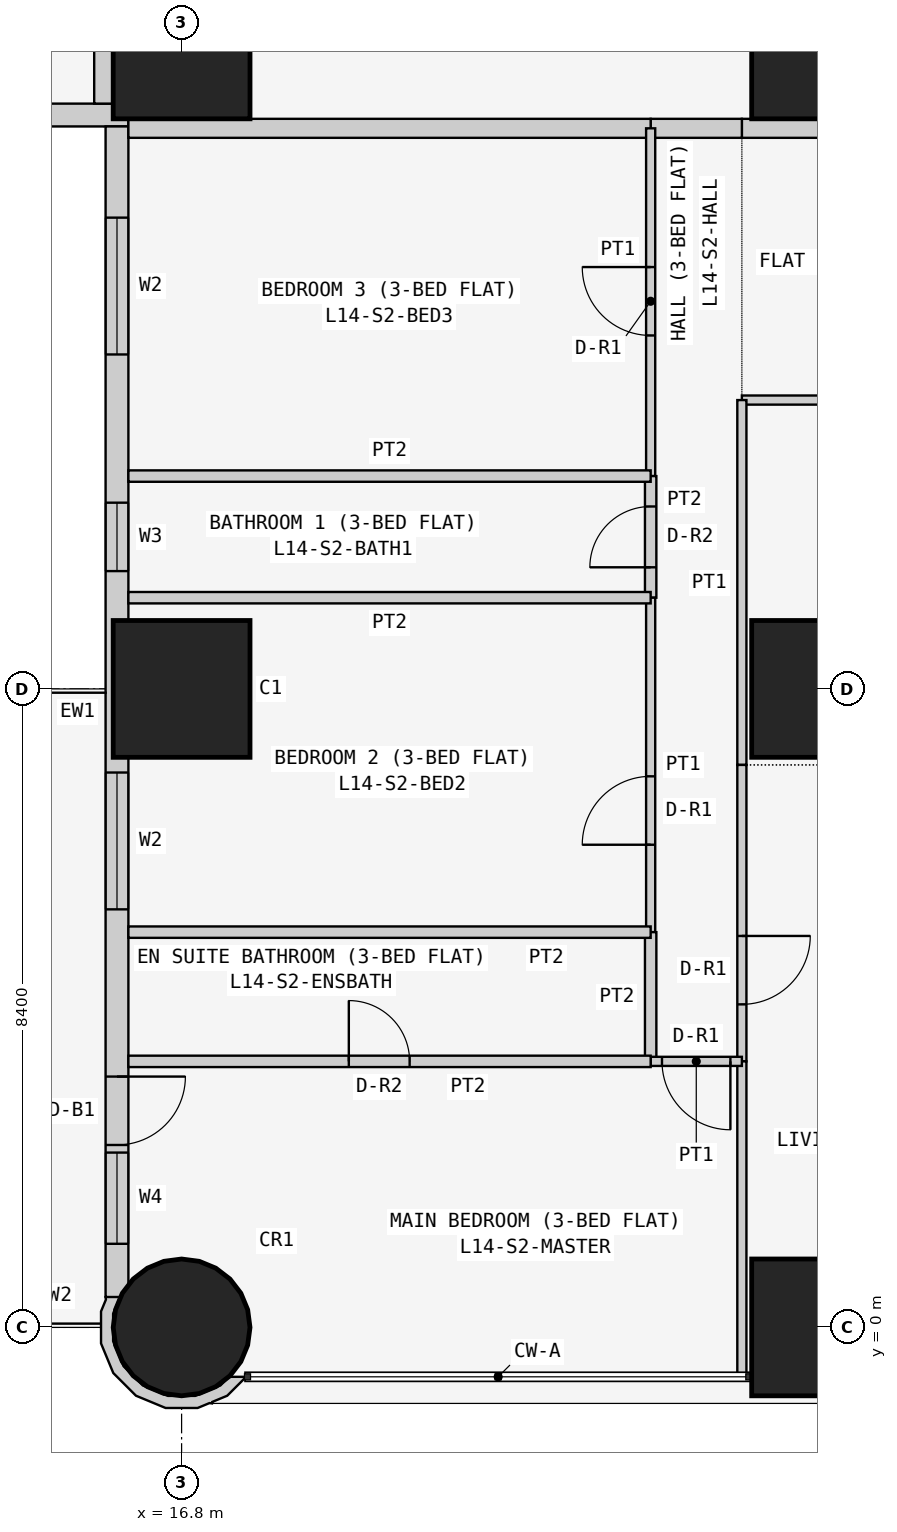
"""IFC4 building model, lengths in metres.
Left out: names, types, materials, properties, quantities, classifications, styles, units other than length and angle.
Written with IfcOpenShell. Run it as: python <this file> out.ifc"""

import sys

from ifc_helpers import new_model, si_unit, direction, frame, frame_2d, origin, origin_2d, place, context, subcontext, project, spatial, polyline, rectangle, circle, outline, extrude, element, fill, save


model = new_model("IFC4")
c1 = context("Model", 3, precision=1e-05, world=origin(), true_north=direction((0.0, 1.0)))
c2 = subcontext(c1, "Body", "Model", "MODEL_VIEW")
j1 = project(units=[si_unit("LENGTHUNIT", "METRE"), si_unit("PLANEANGLEUNIT", "RADIAN")], contexts=[c1])
p1 = place(None, origin())
s1 = spatial("IfcSite", under=j1, at=p1, CompositionType="ELEMENT")
p2 = place(p1, origin())
s2 = spatial("IfcBuilding", under=s1, at=p2, CompositionType="ELEMENT")
p3 = place(p2, frame((0.0, 0.0, 59.7)))
s3 = spatial("IfcBuildingStorey", under=s2, at=p3, CompositionType="ELEMENT", Elevation=59.7)
p4 = place(p3, frame((16.8, 0.0, 0.0), z_axis=(0.0, 0.0, 1.0), x_axis=(1.0, 0.0, 0.0)))
e1 = element("IfcColumn", 1, at=p4, inside=s3, PredefinedType="COLUMN", context=c2, shape_type="SweptSolid", body=[
    extrude(circle(Radius=0.9, at=origin_2d()), origin(), (0.0, 0.0, 1.0), 3.6),
])
for number, where, z_axis, x_axis in (
    (2, (16.8, 8.4, 0.0), (0.0, 0.0, 1.0), (1.0, 0.0, 0.0)),
    (3, (16.8, 16.8, 0.0), (0.0, 0.0, 1.0), (1.0, 0.0, 0.0)),
    (4, (25.2, 0.0, 0.0), (0.0, 0.0, 1.0), (1.0, 0.0, 0.0)),
    (5, (25.2, 8.4, 0.0), (0.0, 0.0, 1.0), (1.0, 0.0, 0.0)),
    (6, (25.2, 16.8, 0.0), (0.0, 0.0, 1.0), (1.0, 0.0, 0.0)),
):
    element("IfcColumn", number, at=place(p3, frame(where, z_axis=z_axis, x_axis=x_axis)), inside=s3, PredefinedType="COLUMN", context=c2, shape_type="SweptSolid", body=[
        extrude(rectangle(XDim=1.8, YDim=1.8, at=origin_2d()), origin(), (0.0, 0.0, 1.0), 3.6),
    ])
p5 = place(p3, frame((0.4, 15.95, 0.0), z_axis=(0.0, 0.0, 1.0), x_axis=(1.0, 0.0, 0.0)))
e7 = element("IfcWall", 7, at=p5, inside=s3, PredefinedType="SOLIDWALL", context=c2, shape_type="SweptSolid", body=[
    extrude(rectangle(XDim=15.7, YDim=0.3, at=frame_2d((7.85, 0.0))), origin(), (0.0, 0.0, 1.0), 3.45),
])
p6 = place(p5, frame((12.4, 0.0, 0.9)))
e8 = element("IfcOpeningElement", 8, at=p6, cuts=e7, PredefinedType="OPENING", context=c2, shape_type="SweptSolid", body=[
    extrude(rectangle(XDim=1.8, YDim=1.5, at=frame_2d((0.9, 0.75))), frame((0.0, 0.16, 0.0), z_axis=(0.0, -1.0, 0.0), x_axis=(1.0, 0.0, 0.0)), (0.0, 0.0, 1.0), 0.32),
])
p7 = place(p5, frame((9.55, 0.0, 1.5)))
e9 = element("IfcOpeningElement", 9, at=p7, cuts=e7, PredefinedType="OPENING", context=c2, shape_type="SweptSolid", body=[
    extrude(rectangle(XDim=0.9, YDim=0.7, at=frame_2d((0.45, 0.35))), frame((0.0, 0.16, 0.0), z_axis=(0.0, -1.0, 0.0), x_axis=(1.0, 0.0, 0.0)), (0.0, 0.0, 1.0), 0.32),
])
p8 = place(p5, frame((5.1, 0.0, 0.9)))
e10 = element("IfcOpeningElement", 10, at=p8, cuts=e7, PredefinedType="OPENING", context=c2, shape_type="SweptSolid", body=[
    extrude(rectangle(XDim=1.8, YDim=1.5, at=frame_2d((0.9, 0.75))), frame((0.0, 0.16, 0.0), z_axis=(0.0, -1.0, 0.0), x_axis=(1.0, 0.0, 0.0)), (0.0, 0.0, 1.0), 0.32),
])
p9 = place(p5, frame((2.0, 0.0, 0.0)))
e11 = element("IfcOpeningElement", 11, at=p9, cuts=e7, PredefinedType="OPENING", context=c2, shape_type="SweptSolid", body=[
    extrude(rectangle(XDim=0.9, YDim=2.4, at=frame_2d((0.45, 1.2))), frame((0.0, 0.16, 0.0), z_axis=(0.0, -1.0, 0.0), x_axis=(1.0, 0.0, 0.0)), (0.0, 0.0, 1.0), 0.32),
])
p10 = place(p5, frame((0.7, 0.0, 0.9)))
e12 = element("IfcOpeningElement", 12, at=p10, cuts=e7, PredefinedType="OPENING", context=c2, shape_type="SweptSolid", body=[
    extrude(rectangle(XDim=1.2, YDim=1.5, at=frame_2d((0.6, 0.75))), frame((0.0, 0.16, 0.0), z_axis=(0.0, -1.0, 0.0), x_axis=(1.0, 0.0, 0.0)), (0.0, 0.0, 1.0), 0.32),
])
p11 = place(p3, frame((15.95, 15.8, 0.0), z_axis=(0.0, 0.0, 1.0), x_axis=(0.0, -1.0, 0.0)))
e13 = element("IfcWall", 13, at=p11, inside=s3, PredefinedType="SOLIDWALL", context=c2, shape_type="SweptSolid", body=[
    extrude(rectangle(XDim=15.4, YDim=0.3, at=frame_2d((7.7, 0.0))), origin(), (0.0, 0.0, 1.0), 3.45),
])
p12 = place(p11, frame((1.2, 0.0, 0.9)))
e14 = element("IfcOpeningElement", 14, at=p12, cuts=e13, PredefinedType="OPENING", context=c2, shape_type="SweptSolid", body=[
    extrude(rectangle(XDim=1.8, YDim=1.5, at=frame_2d((0.9, 0.75))), frame((0.0, 0.16, 0.0), z_axis=(0.0, -1.0, 0.0), x_axis=(1.0, 0.0, 0.0)), (0.0, 0.0, 1.0), 0.32),
])
p13 = place(p11, frame((4.95, 0.0, 1.5)))
e15 = element("IfcOpeningElement", 15, at=p13, cuts=e13, PredefinedType="OPENING", context=c2, shape_type="SweptSolid", body=[
    extrude(rectangle(XDim=0.9, YDim=0.7, at=frame_2d((0.45, 0.35))), frame((0.0, 0.16, 0.0), z_axis=(0.0, -1.0, 0.0), x_axis=(1.0, 0.0, 0.0)), (0.0, 0.0, 1.0), 0.32),
])
p14 = place(p11, frame((8.5, 0.0, 0.9)))
e16 = element("IfcOpeningElement", 16, at=p14, cuts=e13, PredefinedType="OPENING", context=c2, shape_type="SweptSolid", body=[
    extrude(rectangle(XDim=1.8, YDim=1.5, at=frame_2d((0.9, 0.75))), frame((0.0, 0.16, 0.0), z_axis=(0.0, -1.0, 0.0), x_axis=(1.0, 0.0, 0.0)), (0.0, 0.0, 1.0), 0.32),
])
p15 = place(p11, frame((12.5, 0.0, 0.0)))
e17 = element("IfcOpeningElement", 17, at=p15, cuts=e13, PredefinedType="OPENING", context=c2, shape_type="SweptSolid", body=[
    extrude(rectangle(XDim=0.9, YDim=2.4, at=frame_2d((0.45, 1.2))), frame((0.0, 0.16, 0.0), z_axis=(0.0, -1.0, 0.0), x_axis=(1.0, 0.0, 0.0)), (0.0, 0.0, 1.0), 0.32),
])
p16 = place(p11, frame((13.5, 0.0, 0.9)))
e18 = element("IfcOpeningElement", 18, at=p16, cuts=e13, PredefinedType="OPENING", context=c2, shape_type="SweptSolid", body=[
    extrude(rectangle(XDim=1.2, YDim=1.5, at=frame_2d((0.6, 0.75))), frame((0.0, 0.16, 0.0), z_axis=(0.0, -1.0, 0.0), x_axis=(1.0, 0.0, 0.0)), (0.0, 0.0, 1.0), 0.32),
])
p17 = place(p3, frame((15.89, 0.364, 0.0), z_axis=(0.0, 0.0, 1.0), x_axis=(-0.377204953059, -0.926129809145, 0.0)))
e19 = element("IfcWall", 19, at=p17, inside=s3, PredefinedType="SOLIDWALL", context=c2, shape_type="SweptSolid", body=[
    extrude(outline(polyline([(0.36, 1.803), (0.509, 1.741), (0.761, 1.486), (0.896, 1.154), (0.894, 0.795), (0.755, 0.465), (0.5, 0.213), (0.168, 0.078), (-0.1, 0.08), (0.001, -0.097), (0.03, -0.08), (0.199, -0.081), (0.589, 0.078), (0.889, 0.374), (1.053, 0.763), (1.055, 1.185), (0.896, 1.575), (0.778, 1.695), (0.769, 1.728), (0.75, 1.723), (0.6, 1.875), (0.295, 2.004), (0.281, 1.998), (0.36, 1.803)])), origin(), (0.0, 0.0, 1.0), 3.45),
])
p18 = place(p3, frame((29.4, 15.775, 0.0), z_axis=(0.0, 0.0, 1.0), x_axis=(-1.0, 0.0, 0.0)))
e20 = element("IfcWall", 20, at=p18, inside=s3, PredefinedType="PARTITIONING", context=c2, shape_type="SweptSolid", body=[
    extrude(rectangle(XDim=5.229, YDim=0.25, at=frame_2d((2.615, 0.0))), origin(), (0.0, 0.0, 1.0), 3.45),
])
p19 = place(p18, frame((2.1, 0.0, 0.0)))
e21 = element("IfcOpeningElement", 21, at=p19, cuts=e20, PredefinedType="OPENING", context=c2, shape_type="SweptSolid", body=[
    extrude(rectangle(XDim=1.0, YDim=2.1, at=frame_2d((0.5, 1.05))), frame((0.0, 0.135, 0.0), z_axis=(0.0, -1.0, 0.0), x_axis=(1.0, 0.0, 0.0)), (0.0, 0.0, 1.0), 0.27),
])
p20 = place(p3, frame((24.171, 15.775, 0.0), z_axis=(0.0, 0.0, 1.0), x_axis=(-1.0, 0.0, 0.0)))
e22 = element("IfcWall", 22, at=p20, inside=s3, PredefinedType="PARTITIONING", context=c2, shape_type="SweptSolid", body=[
    extrude(rectangle(XDim=1.2, YDim=0.25, at=frame_2d((0.6, 0.0))), origin(), (0.0, 0.0, 1.0), 3.45),
])
for number, where, z_axis, x_axis in (
    (23, (22.971, 15.775, 0.0), (0.0, 0.0, 1.0), (-1.0, 0.0, 0.0)),
    (24, (15.775, 16.1, 0.0), (0.0, 0.0, 1.0), (0.0, 1.0, 0.0)),
):
    element("IfcWall", number, at=place(p3, frame(where, z_axis=z_axis, x_axis=x_axis)), inside=s3, PredefinedType="PARTITIONING", context=c2, shape_type="SweptSolid", body=[
        extrude(rectangle(XDim=6.871, YDim=0.25, at=frame_2d((3.436, 0.0))), origin(), (0.0, 0.0, 1.0), 3.45),
    ])
p21 = place(p3, frame((29.4, 12.2, 0.0), z_axis=(0.0, 0.0, 1.0), x_axis=(-1.0, 0.0, 0.0)))
e25 = element("IfcWall", 25, at=p21, inside=s3, PredefinedType="PARTITIONING", context=c2, shape_type="SweptSolid", body=[
    extrude(rectangle(XDim=5.229, YDim=0.12, at=frame_2d((2.615, 0.0))), origin(), (0.0, 0.0, 1.0), 3.45),
])
p22 = place(p21, frame((1.05, 0.0, 0.0)))
e26 = element("IfcOpeningElement", 26, at=p22, cuts=e25, PredefinedType="OPENING", context=c2, shape_type="SweptSolid", body=[
    extrude(rectangle(XDim=0.9, YDim=2.1, at=frame_2d((0.45, 1.05))), frame((0.0, 0.07, 0.0), z_axis=(0.0, -1.0, 0.0), x_axis=(1.0, 0.0, 0.0)), (0.0, 0.0, 1.0), 0.14),
])
p23 = place(p3, frame((24.171, 7.4, 0.0), z_axis=(0.0, 0.0, 1.0), x_axis=(0.0, 1.0, 0.0)))
e27 = element("IfcWall", 27, at=p23, inside=s3, PredefinedType="PARTITIONING", context=c2, shape_type="SweptSolid", body=[
    extrude(rectangle(XDim=4.8, YDim=0.12, at=frame_2d((2.4, 0.0))), origin(), (0.0, 0.0, 1.0), 3.45),
])
p24 = place(p3, frame((24.171, 3.5, 0.0), z_axis=(0.0, 0.0, 1.0), x_axis=(0.0, 1.0, 0.0)))
e28 = element("IfcWall", 28, at=p24, inside=s3, PredefinedType="PARTITIONING", context=c2, shape_type="SweptSolid", body=[
    extrude(rectangle(XDim=3.9, YDim=0.12, at=frame_2d((1.95, 0.0))), origin(), (0.0, 0.0, 1.0), 3.45),
])
p25 = place(p24, frame((0.75, 0.0, 0.0)))
e29 = element("IfcOpeningElement", 29, at=p25, cuts=e28, PredefinedType="OPENING", context=c2, shape_type="SweptSolid", body=[
    extrude(rectangle(XDim=0.9, YDim=2.1, at=frame_2d((0.45, 1.05))), frame((0.0, 0.07, 0.0), z_axis=(0.0, -1.0, 0.0), x_axis=(1.0, 0.0, 0.0)), (0.0, 0.0, 1.0), 0.14),
])
p26 = place(p3, frame((24.171, -0.65, 0.0), z_axis=(0.0, 0.0, 1.0), x_axis=(0.0, 1.0, 0.0)))
e30 = element("IfcWall", 30, at=p26, inside=s3, PredefinedType="PARTITIONING", context=c2, shape_type="SweptSolid", body=[
    extrude(rectangle(XDim=4.15, YDim=0.12, at=frame_2d((2.075, 0.0))), origin(), (0.0, 0.0, 1.0), 3.45),
])
p27 = place(p3, frame((22.971, 11.2, 0.0), z_axis=(0.0, 0.0, 1.0), x_axis=(0.0, 1.0, 0.0)))
e31 = element("IfcWall", 31, at=p27, inside=s3, PredefinedType="PARTITIONING", context=c2, shape_type="SweptSolid", body=[
    extrude(rectangle(XDim=4.575, YDim=0.12, at=frame_2d((2.288, 0.0))), origin(), (0.0, 0.0, 1.0), 3.45),
])
p28 = place(p27, frame((1.85, 0.0, 0.0)))
e32 = element("IfcOpeningElement", 32, at=p28, cuts=e31, PredefinedType="OPENING", context=c2, shape_type="SweptSolid", body=[
    extrude(rectangle(XDim=0.9, YDim=2.1, at=frame_2d((0.45, 1.05))), frame((0.0, 0.07, 0.0), z_axis=(0.0, -1.0, 0.0), x_axis=(1.0, 0.0, 0.0)), (0.0, 0.0, 1.0), 0.14),
])
p29 = place(p3, frame((22.971, 9.6, 0.0), z_axis=(0.0, 0.0, 1.0), x_axis=(0.0, 1.0, 0.0)))
e33 = element("IfcWall", 33, at=p29, inside=s3, PredefinedType="PARTITIONING", context=c2, shape_type="SweptSolid", body=[
    extrude(rectangle(XDim=1.6, YDim=0.15, at=frame_2d((0.8, 0.0))), origin(), (0.0, 0.0, 1.0), 3.45),
])
p30 = place(p29, frame((0.4, 0.0, 0.0)))
e34 = element("IfcOpeningElement", 34, at=p30, cuts=e33, PredefinedType="OPENING", context=c2, shape_type="SweptSolid", body=[
    extrude(rectangle(XDim=0.8, YDim=2.1, at=frame_2d((0.4, 1.05))), frame((0.0, 0.085, 0.0), z_axis=(0.0, -1.0, 0.0), x_axis=(1.0, 0.0, 0.0)), (0.0, 0.0, 1.0), 0.17),
])
p31 = place(p3, frame((22.971, 5.2, 0.0), z_axis=(0.0, 0.0, 1.0), x_axis=(0.0, 1.0, 0.0)))
e35 = element("IfcWall", 35, at=p31, inside=s3, PredefinedType="PARTITIONING", context=c2, shape_type="SweptSolid", body=[
    extrude(rectangle(XDim=4.4, YDim=0.12, at=frame_2d((2.2, 0.0))), origin(), (0.0, 0.0, 1.0), 3.45),
])
p32 = place(p31, frame((1.15, 0.0, 0.0)))
e36 = element("IfcOpeningElement", 36, at=p32, cuts=e35, PredefinedType="OPENING", context=c2, shape_type="SweptSolid", body=[
    extrude(rectangle(XDim=0.9, YDim=2.1, at=frame_2d((0.45, 1.05))), frame((0.0, 0.07, 0.0), z_axis=(0.0, -1.0, 0.0), x_axis=(1.0, 0.0, 0.0)), (0.0, 0.0, 1.0), 0.14),
])
p33 = place(p3, frame((22.971, 3.5, 0.0), z_axis=(0.0, 0.0, 1.0), x_axis=(0.0, 1.0, 0.0)))
e37 = element("IfcWall", 37, at=p33, inside=s3, PredefinedType="PARTITIONING", context=c2, shape_type="SweptSolid", body=[
    extrude(rectangle(XDim=1.7, YDim=0.15, at=frame_2d((0.85, 0.0))), origin(), (0.0, 0.0, 1.0), 3.45),
])
p34 = place(p3, frame((24.171, 3.5, 0.0), z_axis=(0.0, 0.0, 1.0), x_axis=(-1.0, 0.0, 0.0)))
e38 = element("IfcWall", 38, at=p34, inside=s3, PredefinedType="PARTITIONING", context=c2, shape_type="SweptSolid", body=[
    extrude(rectangle(XDim=1.2, YDim=0.12, at=frame_2d((0.6, 0.0))), origin(), (0.0, 0.0, 1.0), 3.45),
])
p35 = place(p34, frame((0.151, 0.0, 0.0)))
e39 = element("IfcOpeningElement", 39, at=p35, cuts=e38, PredefinedType="OPENING", context=c2, shape_type="SweptSolid", body=[
    extrude(rectangle(XDim=0.9, YDim=2.1, at=frame_2d((0.45, 1.05))), frame((0.0, 0.07, 0.0), z_axis=(0.0, -1.0, 0.0), x_axis=(1.0, 0.0, 0.0)), (0.0, 0.0, 1.0), 0.14),
])
for number, where, z_axis, x_axis in (
    (40, (22.971, 11.2, 0.0), (0.0, 0.0, 1.0), (-1.0, 0.0, 0.0)),
    (41, (22.971, 9.6, 0.0), (0.0, 0.0, 1.0), (-1.0, 0.0, 0.0)),
    (42, (22.971, 5.2, 0.0), (0.0, 0.0, 1.0), (-1.0, 0.0, 0.0)),
):
    element("IfcWall", number, at=place(p3, frame(where, z_axis=z_axis, x_axis=x_axis)), inside=s3, PredefinedType="PARTITIONING", context=c2, shape_type="SweptSolid", body=[
        extrude(rectangle(XDim=6.871, YDim=0.15, at=frame_2d((3.436, 0.0))), origin(), (0.0, 0.0, 1.0), 3.45),
    ])
p36 = place(p3, frame((22.971, 3.5, 0.0), z_axis=(0.0, 0.0, 1.0), x_axis=(-1.0, 0.0, 0.0)))
e43 = element("IfcWall", 43, at=p36, inside=s3, PredefinedType="PARTITIONING", context=c2, shape_type="SweptSolid", body=[
    extrude(rectangle(XDim=6.871, YDim=0.15, at=frame_2d((3.436, 0.0))), origin(), (0.0, 0.0, 1.0), 3.45),
])
p37 = place(p36, frame((3.171, 0.0, 0.0)))
e44 = element("IfcOpeningElement", 44, at=p37, cuts=e43, PredefinedType="OPENING", context=c2, shape_type="SweptSolid", body=[
    extrude(rectangle(XDim=0.8, YDim=2.1, at=frame_2d((0.4, 1.05))), frame((0.0, 0.085, 0.0), z_axis=(0.0, -1.0, 0.0), x_axis=(1.0, 0.0, 0.0)), (0.0, 0.0, 1.0), 0.17),
])
p38 = place(p12, origin())
e45 = element("IfcWindow", 45, at=p38, inside=s3, PartitioningType="SINGLE_PANEL", PredefinedType="WINDOW", context=c2, shape_type="SweptSolid", body=[
    extrude(rectangle(XDim=1.8, YDim=1.5, at=frame_2d((0.9, 0.75))), frame((0.0, 0.03, 0.0), z_axis=(0.0, -1.0, 0.0), x_axis=(1.0, 0.0, 0.0)), (0.0, 0.0, 1.0), 0.06),
])
fill(e14, e45)
p39 = place(p13, origin())
e46 = element("IfcWindow", 46, at=p39, inside=s3, PartitioningType="SINGLE_PANEL", PredefinedType="WINDOW", context=c2, shape_type="SweptSolid", body=[
    extrude(rectangle(XDim=0.9, YDim=0.7, at=frame_2d((0.45, 0.35))), frame((0.0, 0.03, 0.0), z_axis=(0.0, -1.0, 0.0), x_axis=(1.0, 0.0, 0.0)), (0.0, 0.0, 1.0), 0.06),
])
fill(e15, e46)
p40 = place(p14, origin())
e47 = element("IfcWindow", 47, at=p40, inside=s3, PartitioningType="SINGLE_PANEL", PredefinedType="WINDOW", context=c2, shape_type="SweptSolid", body=[
    extrude(rectangle(XDim=1.8, YDim=1.5, at=frame_2d((0.9, 0.75))), frame((0.0, 0.03, 0.0), z_axis=(0.0, -1.0, 0.0), x_axis=(1.0, 0.0, 0.0)), (0.0, 0.0, 1.0), 0.06),
])
fill(e16, e47)
p41 = place(p15, origin())
e48 = element("IfcDoor", 48, at=p41, inside=s3, OperationType="SINGLE_SWING_LEFT", PredefinedType="DOOR", context=c2, shape_type="SweptSolid", body=[
    extrude(rectangle(XDim=0.9, YDim=2.4, at=frame_2d((0.45, 1.2))), frame((0.0, 0.025, 0.0), z_axis=(0.0, -1.0, 0.0), x_axis=(1.0, 0.0, 0.0)), (0.0, 0.0, 1.0), 0.05),
])
fill(e17, e48)
p42 = place(p16, origin())
e49 = element("IfcWindow", 49, at=p42, inside=s3, PartitioningType="SINGLE_PANEL", PredefinedType="WINDOW", context=c2, shape_type="SweptSolid", body=[
    extrude(rectangle(XDim=1.2, YDim=1.5, at=frame_2d((0.6, 0.75))), frame((0.0, 0.03, 0.0), z_axis=(0.0, -1.0, 0.0), x_axis=(1.0, 0.0, 0.0)), (0.0, 0.0, 1.0), 0.06),
])
fill(e18, e49)
p43 = place(p25, frame((0.9, 0.0, 0.0), z_axis=(0.0, 0.0, 1.0), x_axis=(-1.0, 0.0, 0.0)))
e50 = element("IfcDoor", 50, at=p43, inside=s3, OperationType="SINGLE_SWING_LEFT", PredefinedType="DOOR", context=c2, shape_type="SweptSolid", body=[
    extrude(rectangle(XDim=0.9, YDim=2.1, at=frame_2d((0.45, 1.05))), frame((0.0, 0.025, 0.0), z_axis=(0.0, -1.0, 0.0), x_axis=(1.0, 0.0, 0.0)), (0.0, 0.0, 1.0), 0.05),
])
fill(e29, e50)
p44 = place(p28, origin())
e51 = element("IfcDoor", 51, at=p44, inside=s3, OperationType="SINGLE_SWING_RIGHT", PredefinedType="DOOR", context=c2, shape_type="SweptSolid", body=[
    extrude(rectangle(XDim=0.9, YDim=2.1, at=frame_2d((0.45, 1.05))), frame((0.0, 0.025, 0.0), z_axis=(0.0, -1.0, 0.0), x_axis=(1.0, 0.0, 0.0)), (0.0, 0.0, 1.0), 0.05),
])
fill(e32, e51)
p45 = place(p30, origin())
e52 = element("IfcDoor", 52, at=p45, inside=s3, OperationType="SINGLE_SWING_LEFT", PredefinedType="DOOR", context=c2, shape_type="SweptSolid", body=[
    extrude(rectangle(XDim=0.8, YDim=2.1, at=frame_2d((0.4, 1.05))), frame((0.0, 0.025, 0.0), z_axis=(0.0, -1.0, 0.0), x_axis=(1.0, 0.0, 0.0)), (0.0, 0.0, 1.0), 0.05),
])
fill(e34, e52)
p46 = place(p32, origin())
e53 = element("IfcDoor", 53, at=p46, inside=s3, OperationType="SINGLE_SWING_LEFT", PredefinedType="DOOR", context=c2, shape_type="SweptSolid", body=[
    extrude(rectangle(XDim=0.9, YDim=2.1, at=frame_2d((0.45, 1.05))), frame((0.0, 0.025, 0.0), z_axis=(0.0, -1.0, 0.0), x_axis=(1.0, 0.0, 0.0)), (0.0, 0.0, 1.0), 0.05),
])
fill(e36, e53)
p47 = place(p35, origin())
e54 = element("IfcDoor", 54, at=p47, inside=s3, OperationType="SINGLE_SWING_LEFT", PredefinedType="DOOR", context=c2, shape_type="SweptSolid", body=[
    extrude(rectangle(XDim=0.9, YDim=2.1, at=frame_2d((0.45, 1.05))), frame((0.0, 0.025, 0.0), z_axis=(0.0, -1.0, 0.0), x_axis=(1.0, 0.0, 0.0)), (0.0, 0.0, 1.0), 0.05),
])
fill(e39, e54)
p48 = place(p37, frame((0.8, 0.0, 0.0), z_axis=(0.0, 0.0, 1.0), x_axis=(-1.0, 0.0, 0.0)))
e55 = element("IfcDoor", 55, at=p48, inside=s3, OperationType="SINGLE_SWING_LEFT", PredefinedType="DOOR", context=c2, shape_type="SweptSolid", body=[
    extrude(rectangle(XDim=0.8, YDim=2.1, at=frame_2d((0.4, 1.05))), frame((0.0, 0.025, 0.0), z_axis=(0.0, -1.0, 0.0), x_axis=(1.0, 0.0, 0.0)), (0.0, 0.0, 1.0), 0.05),
])
fill(e44, e55)
save(model, sys.argv[1])
